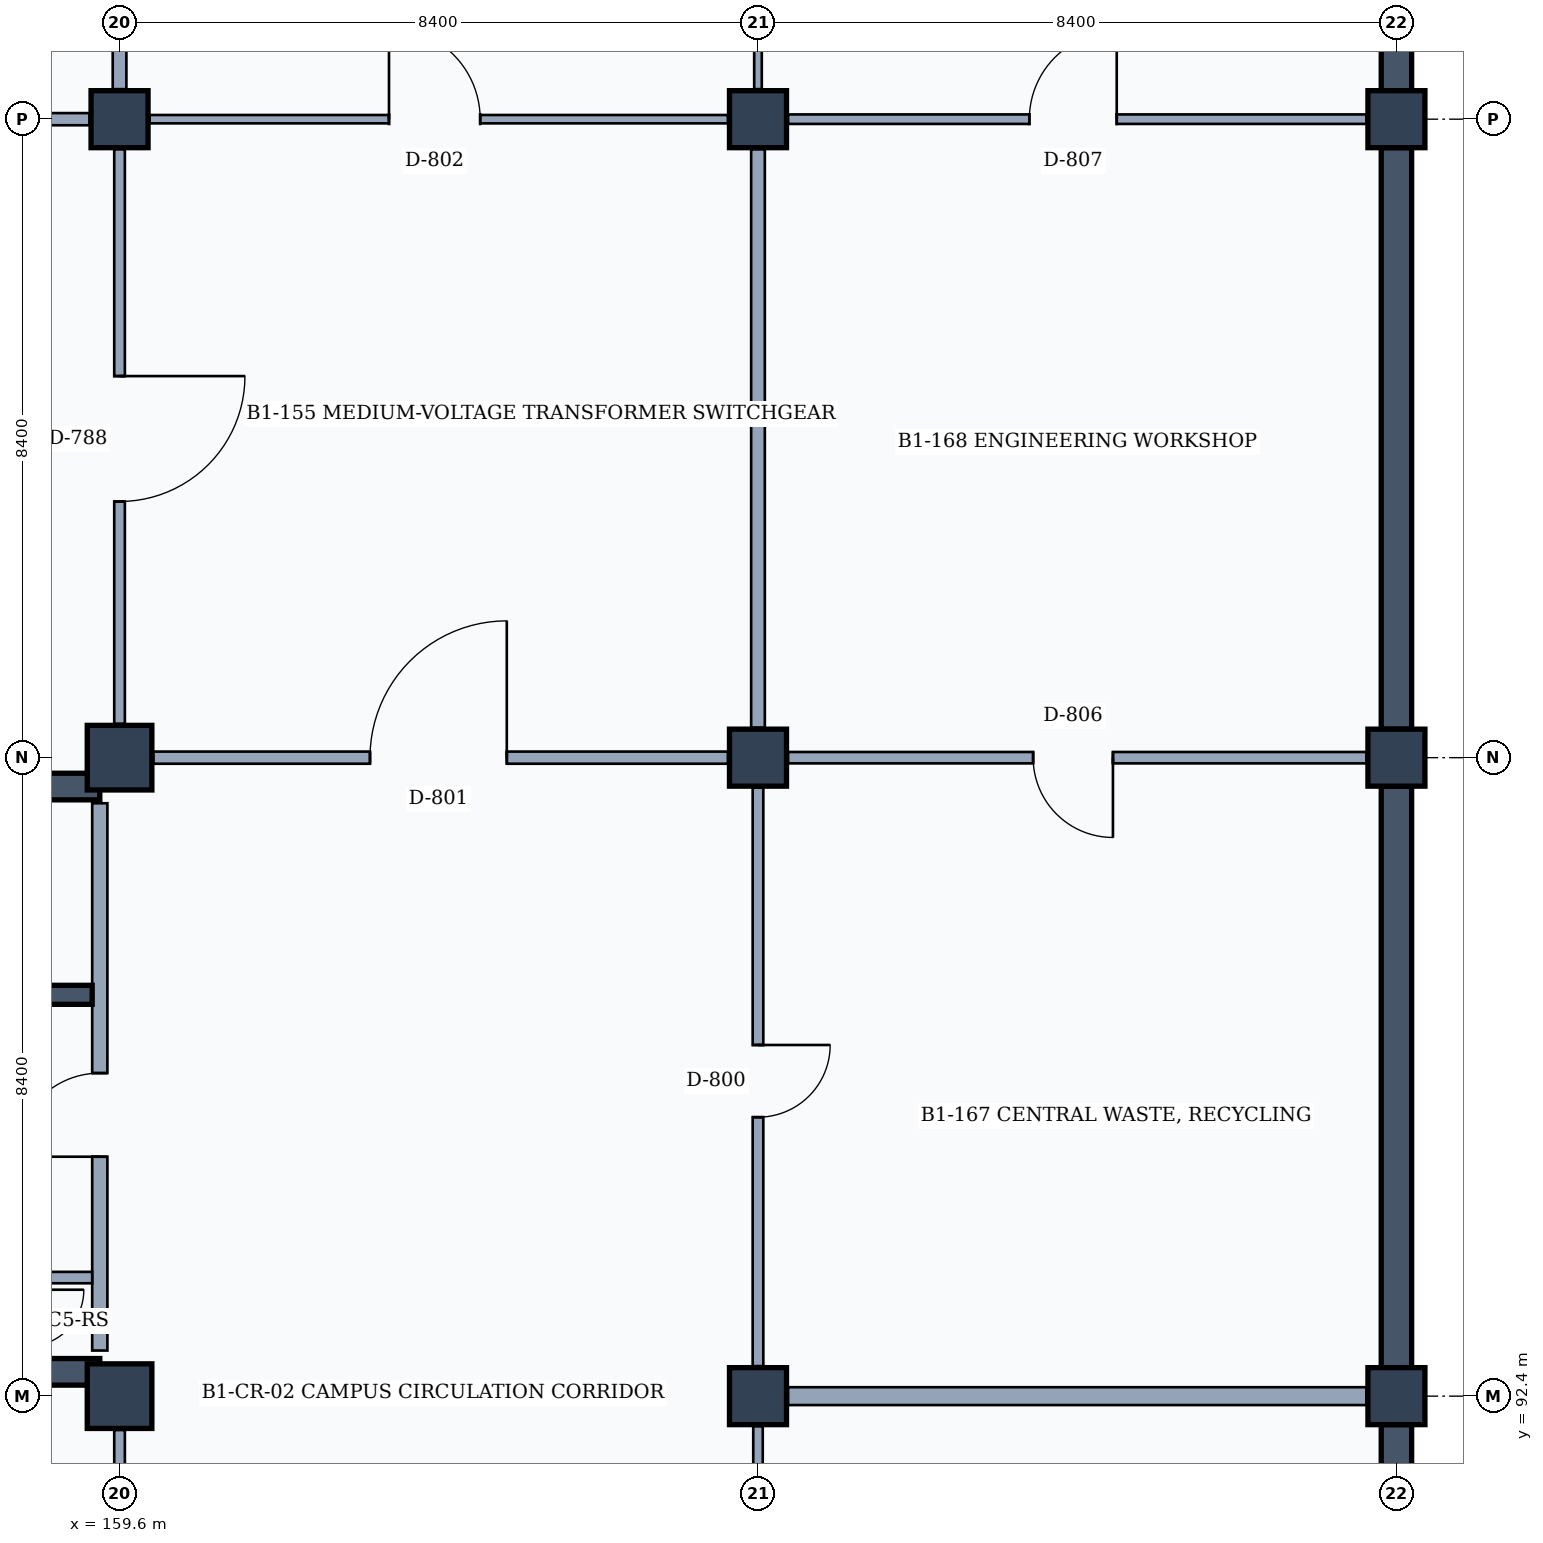
"""IFC4 building model, lengths in metres.
Left out: names, types, materials, properties, quantities, classifications, styles, units other than length and angle.
Written with IfcOpenShell. Run it as: python <this file> out.ifc"""

import sys

from ifc_helpers import new_model, si_unit, direction, frame, frame_2d, origin, origin_2d, place, context, subcontext, project, spatial, rectangle, extrude, element, fill, save


model = new_model("IFC4")
c1 = context("Model", 3, precision=1e-05, world=origin(), true_north=direction((0.0, 1.0)))
c2 = subcontext(c1, "Body", "Model", "MODEL_VIEW")
j1 = project(units=[si_unit("LENGTHUNIT", "METRE"), si_unit("PLANEANGLEUNIT", "RADIAN")], contexts=[c1])
p1 = place(None, origin())
s1 = spatial("IfcSite", under=j1, at=p1, CompositionType="ELEMENT")
p2 = place(p1, origin())
s2 = spatial("IfcBuilding", under=s1, at=p2, CompositionType="ELEMENT")
p3 = place(p2, frame((0.0, 0.0, -4.2)))
s3 = spatial("IfcBuildingStorey", under=s2, at=p3, CompositionType="ELEMENT", Elevation=-4.2)
for number, where, z_axis, x_axis in (
    (1, (159.6, 92.4, 0.0), (0.0, 0.0, 1.0), (1.0, 0.0, 0.0)),
    (2, (159.6, 100.8, 0.0), (0.0, 0.0, 1.0), (1.0, 0.0, 0.0)),
):
    element("IfcColumn", number, at=place(p3, frame(where, z_axis=z_axis, x_axis=x_axis)), inside=s3, PredefinedType="COLUMN", context=c2, shape_type="SweptSolid", body=[
        extrude(rectangle(XDim=0.85, YDim=0.85, at=origin_2d()), origin(), (0.0, 0.0, 1.0), 4.2),
    ])
for number, where, z_axis, x_axis in (
    (3, (159.6, 109.2, 0.0), (0.0, 0.0, 1.0), (1.0, 0.0, 0.0)),
    (4, (168.0, 92.4, 0.0), (0.0, 0.0, 1.0), (1.0, 0.0, 0.0)),
    (5, (168.0, 100.8, 0.0), (0.0, 0.0, 1.0), (1.0, 0.0, 0.0)),
    (6, (168.0, 109.2, 0.0), (0.0, 0.0, 1.0), (1.0, 0.0, 0.0)),
    (7, (176.4, 92.4, 0.0), (0.0, 0.0, 1.0), (1.0, 0.0, 0.0)),
    (8, (176.4, 100.8, 0.0), (0.0, 0.0, 1.0), (1.0, 0.0, 0.0)),
    (9, (176.4, 109.2, 0.0), (0.0, 0.0, 1.0), (1.0, 0.0, 0.0)),
):
    element("IfcColumn", number, at=place(p3, frame(where, z_axis=z_axis, x_axis=x_axis)), inside=s3, PredefinedType="COLUMN", context=c2, shape_type="SweptSolid", body=[
        extrude(rectangle(XDim=0.75, YDim=0.75, at=origin_2d()), origin(), (0.0, 0.0, 1.0), 4.2),
    ])
p4 = place(p3, frame((176.4, 92.025, 0.0), z_axis=(0.0, 0.0, 1.0), x_axis=(0.0, -1.0, 0.0)))
e10 = element("IfcWall", 10, at=p4, inside=s3, PredefinedType="STANDARD", context=c2, shape_type="SweptSolid", body=[
    extrude(rectangle(XDim=7.65, YDim=0.4, at=frame_2d((3.825, 0.0))), origin(), (0.0, 0.0, 1.0), 3.88),
])
p5 = place(p3, frame((176.4, 100.425, 0.0), z_axis=(0.0, 0.0, 1.0), x_axis=(0.0, -1.0, 0.0)))
e11 = element("IfcWall", 11, at=p5, inside=s3, PredefinedType="STANDARD", context=c2, shape_type="SweptSolid", body=[
    extrude(rectangle(XDim=7.65, YDim=0.4, at=frame_2d((3.825, 0.0))), origin(), (0.0, 0.0, 1.0), 3.88),
])
p6 = place(p3, frame((176.4, 108.825, 0.0), z_axis=(0.0, 0.0, 1.0), x_axis=(0.0, -1.0, 0.0)))
e12 = element("IfcWall", 12, at=p6, inside=s3, PredefinedType="STANDARD", context=c2, shape_type="SweptSolid", body=[
    extrude(rectangle(XDim=7.65, YDim=0.4, at=frame_2d((3.825, 0.0))), origin(), (0.0, 0.0, 1.0), 3.88),
])
p7 = place(p3, frame((176.4, 117.225, 0.0), z_axis=(0.0, 0.0, 1.0), x_axis=(0.0, -1.0, 0.0)))
e13 = element("IfcWall", 13, at=p7, inside=s3, PredefinedType="STANDARD", context=c2, shape_type="SweptSolid", body=[
    extrude(rectangle(XDim=7.65, YDim=0.4, at=frame_2d((3.825, 0.0))), origin(), (0.0, 0.0, 1.0), 3.88),
])
p8 = place(p3, frame((151.44, 100.42, 0.0), z_axis=(0.0, 0.0, 1.0), x_axis=(1.0, 0.0, 0.0)))
e14 = element("IfcWall", 14, at=p8, inside=s3, PredefinedType="SHEAR", context=c2, shape_type="SweptSolid", body=[
    extrude(rectangle(XDim=7.9, YDim=0.35, at=frame_2d((3.95, 0.0))), origin(), (0.0, 0.0, 1.0), 3.9),
])
p9 = place(p3, frame((159.34, 100.2, 0.0), z_axis=(0.0, 0.0, 1.0), x_axis=(0.0, -1.0, 0.0)))
e15 = element("IfcWall", 15, at=p9, inside=s3, PredefinedType="PARTITIONING", context=c2, shape_type="SweptSolid", body=[
    extrude(rectangle(XDim=7.2, YDim=0.2, at=frame_2d((3.6, 0.0))), origin(), (0.0, 0.0, 1.0), 3.1),
])
p10 = place(p9, frame((3.55, 0.0, 0.0)))
e16 = element("IfcOpeningElement", 16, at=p10, cuts=e15, PredefinedType="OPENING", context=c2, shape_type="SweptSolid", body=[
    extrude(rectangle(XDim=1.1, YDim=2.15, at=frame_2d((0.55, 1.075))), frame((0.0, 0.11, 0.0), z_axis=(0.0, -1.0, 0.0), x_axis=(1.0, 0.0, 0.0)), (0.0, 0.0, 1.0), 0.22),
])
p11 = place(p3, frame((159.34, 92.72, 0.0), z_axis=(0.0, 0.0, 1.0), x_axis=(-1.0, 0.0, 0.0)))
e17 = element("IfcWall", 17, at=p11, inside=s3, PredefinedType="SHEAR", context=c2, shape_type="SweptSolid", body=[
    extrude(rectangle(XDim=7.9, YDim=0.35, at=frame_2d((3.95, 0.0))), origin(), (0.0, 0.0, 1.0), 3.9),
])
p12 = place(p3, frame((158.38, 93.96, 0.0), z_axis=(0.0, 0.0, 1.0), x_axis=(1.0, 0.0, 0.0)))
e18 = element("IfcWall", 18, at=p12, inside=s3, PredefinedType="PARTITIONING", context=c2, shape_type="SweptSolid", body=[
    extrude(rectangle(XDim=0.86, YDim=0.15, at=frame_2d((0.43, 0.0))), origin(), (0.0, 0.0, 1.0), 3.32),
])
p13 = place(p3, frame((155.78, 97.68, 0.0), z_axis=(0.0, 0.0, 1.0), x_axis=(1.0, 0.0, 0.0)))
e19 = element("IfcWall", 19, at=p13, inside=s3, PredefinedType="SHEAR", context=c2, shape_type="SweptSolid", body=[
    extrude(rectangle(XDim=3.46, YDim=0.25, at=frame_2d((1.73, 0.0))), origin(), (0.0, 0.0, 1.0), 3.9),
])
p14 = place(p13, frame((1.1, 0.0, 0.0)))
e20 = element("IfcOpeningElement", 20, at=p14, cuts=e19, PredefinedType="OPENING", context=c2, shape_type="SweptSolid", body=[
    extrude(rectangle(XDim=1.1, YDim=2.15, at=frame_2d((0.55, 1.075))), frame((0.0, 0.135, 0.0), z_axis=(0.0, -1.0, 0.0), x_axis=(1.0, 0.0, 0.0)), (0.0, 0.0, 1.0), 0.27),
])
p15 = place(p3, frame((159.6, 84.395, 0.0), z_axis=(0.0, 0.0, 1.0), x_axis=(0.0, 1.0, 0.0)))
e21 = element("IfcWall", 21, at=p15, inside=s3, PredefinedType="PARTITIONING", context=c2, shape_type="SweptSolid", body=[
    extrude(rectangle(XDim=7.56, YDim=0.14, at=frame_2d((3.78, 0.0))), origin(), (0.0, 0.0, 1.0), 3.1),
])
p16 = place(p15, frame((3.275, 0.0, 0.0)))
e22 = element("IfcOpeningElement", 22, at=p16, cuts=e21, PredefinedType="OPENING", context=c2, shape_type="SweptSolid", body=[
    extrude(rectangle(XDim=0.95, YDim=2.15, at=frame_2d((0.475, 1.075))), frame((0.0, 0.08, 0.0), z_axis=(0.0, -1.0, 0.0), x_axis=(1.0, 0.0, 0.0)), (0.0, 0.0, 1.0), 0.16),
])
p17 = place(p3, frame((159.6, 101.245, 0.0), z_axis=(0.0, 0.0, 1.0), x_axis=(0.0, 1.0, 0.0)))
e23 = element("IfcWall", 23, at=p17, inside=s3, PredefinedType="PARTITIONING", context=c2, shape_type="SweptSolid", body=[
    extrude(rectangle(XDim=7.56, YDim=0.14, at=frame_2d((3.78, 0.0))), origin(), (0.0, 0.0, 1.0), 3.1),
])
p18 = place(p17, frame((2.925, 0.0, 0.0)))
e24 = element("IfcOpeningElement", 24, at=p18, cuts=e23, PredefinedType="OPENING", context=c2, shape_type="SweptSolid", body=[
    extrude(rectangle(XDim=1.65, YDim=2.25, at=frame_2d((0.825, 1.125))), frame((0.0, 0.08, 0.0), z_axis=(0.0, -1.0, 0.0), x_axis=(1.0, 0.0, 0.0)), (0.0, 0.0, 1.0), 0.16),
])
p19 = place(p3, frame((151.595, 109.2, 0.0), z_axis=(0.0, 0.0, 1.0), x_axis=(1.0, 0.0, 0.0)))
e25 = element("IfcWall", 25, at=p19, inside=s3, PredefinedType="PARTITIONING", context=c2, shape_type="SweptSolid", body=[
    extrude(rectangle(XDim=7.61, YDim=0.16, at=frame_2d((3.805, 0.0))), origin(), (0.0, 0.0, 1.0), 3.05),
])
p20 = place(p19, frame((3.225, 0.0, 0.0)))
e26 = element("IfcOpeningElement", 26, at=p20, cuts=e25, PredefinedType="OPENING", context=c2, shape_type="SweptSolid", body=[
    extrude(rectangle(XDim=1.05, YDim=2.2, at=frame_2d((0.525, 1.1))), frame((0.0, 0.09, 0.0), z_axis=(0.0, -1.0, 0.0), x_axis=(1.0, 0.0, 0.0)), (0.0, 0.0, 1.0), 0.18),
])
p21 = place(p3, frame((159.6, 109.595, 0.0), z_axis=(0.0, 0.0, 1.0), x_axis=(0.0, 1.0, 0.0)))
e27 = element("IfcWall", 27, at=p21, inside=s3, PredefinedType="PARTITIONING", context=c2, shape_type="SweptSolid", body=[
    extrude(rectangle(XDim=7.61, YDim=0.18, at=frame_2d((3.805, 0.0))), origin(), (0.0, 0.0, 1.0), 3.1),
])
p22 = place(p3, frame((168.0, 84.395, 0.0), z_axis=(0.0, 0.0, 1.0), x_axis=(0.0, 1.0, 0.0)))
e28 = element("IfcWall", 28, at=p22, inside=s3, PredefinedType="PARTITIONING", context=c2, shape_type="SweptSolid", body=[
    extrude(rectangle(XDim=7.61, YDim=0.125, at=frame_2d((3.805, 0.0))), origin(), (0.0, 0.0, 1.0), 3.1),
])
p23 = place(p22, frame((3.25, 0.0, 0.0)))
e29 = element("IfcOpeningElement", 29, at=p23, cuts=e28, PredefinedType="OPENING", context=c2, shape_type="SweptSolid", body=[
    extrude(rectangle(XDim=1.0, YDim=2.15, at=frame_2d((0.5, 1.075))), frame((0.0, 0.073, 0.0), z_axis=(0.0, -1.0, 0.0), x_axis=(1.0, 0.0, 0.0)), (0.0, 0.0, 1.0), 0.145),
])
p24 = place(p3, frame((168.0, 92.795, 0.0), z_axis=(0.0, 0.0, 1.0), x_axis=(0.0, 1.0, 0.0)))
e30 = element("IfcWall", 30, at=p24, inside=s3, PredefinedType="PARTITIONING", context=c2, shape_type="SweptSolid", body=[
    extrude(rectangle(XDim=7.61, YDim=0.14, at=frame_2d((3.805, 0.0))), origin(), (0.0, 0.0, 1.0), 3.1),
])
p25 = place(p24, frame((3.275, 0.0, 0.0)))
e31 = element("IfcOpeningElement", 31, at=p25, cuts=e30, PredefinedType="OPENING", context=c2, shape_type="SweptSolid", body=[
    extrude(rectangle(XDim=0.95, YDim=2.15, at=frame_2d((0.475, 1.075))), frame((0.0, 0.08, 0.0), z_axis=(0.0, -1.0, 0.0), x_axis=(1.0, 0.0, 0.0)), (0.0, 0.0, 1.0), 0.16),
])
p26 = place(p3, frame((160.045, 100.8, 0.0), z_axis=(0.0, 0.0, 1.0), x_axis=(1.0, 0.0, 0.0)))
e32 = element("IfcWall", 32, at=p26, inside=s3, PredefinedType="PARTITIONING", context=c2, shape_type="SweptSolid", body=[
    extrude(rectangle(XDim=7.56, YDim=0.16, at=frame_2d((3.78, 0.0))), origin(), (0.0, 0.0, 1.0), 3.05),
])
p27 = place(p26, frame((2.85, 0.0, 0.0)))
e33 = element("IfcOpeningElement", 33, at=p27, cuts=e32, PredefinedType="OPENING", context=c2, shape_type="SweptSolid", body=[
    extrude(rectangle(XDim=1.8, YDim=2.3, at=frame_2d((0.9, 1.15))), frame((0.0, 0.09, 0.0), z_axis=(0.0, -1.0, 0.0), x_axis=(1.0, 0.0, 0.0)), (0.0, 0.0, 1.0), 0.18),
])
p28 = place(p3, frame((168.0, 101.195, 0.0), z_axis=(0.0, 0.0, 1.0), x_axis=(0.0, 1.0, 0.0)))
e34 = element("IfcWall", 34, at=p28, inside=s3, PredefinedType="PARTITIONING", context=c2, shape_type="SweptSolid", body=[
    extrude(rectangle(XDim=7.61, YDim=0.18, at=frame_2d((3.805, 0.0))), origin(), (0.0, 0.0, 1.0), 3.1),
])
p29 = place(p3, frame((159.995, 109.2, 0.0), z_axis=(0.0, 0.0, 1.0), x_axis=(1.0, 0.0, 0.0)))
e35 = element("IfcWall", 35, at=p29, inside=s3, PredefinedType="PARTITIONING", context=c2, shape_type="SweptSolid", body=[
    extrude(rectangle(XDim=7.61, YDim=0.11, at=frame_2d((3.805, 0.0))), origin(), (0.0, 0.0, 1.0), 3.05),
])
p30 = place(p29, frame((3.15, 0.0, 0.0)))
e36 = element("IfcOpeningElement", 36, at=p30, cuts=e35, PredefinedType="OPENING", context=c2, shape_type="SweptSolid", body=[
    extrude(rectangle(XDim=1.2, YDim=2.2, at=frame_2d((0.6, 1.1))), frame((0.0, 0.065, 0.0), z_axis=(0.0, -1.0, 0.0), x_axis=(1.0, 0.0, 0.0)), (0.0, 0.0, 1.0), 0.13),
])
p31 = place(p3, frame((168.0, 109.595, 0.0), z_axis=(0.0, 0.0, 1.0), x_axis=(0.0, 1.0, 0.0)))
e37 = element("IfcWall", 37, at=p31, inside=s3, PredefinedType="MOVABLE", context=c2, shape_type="SweptSolid", body=[
    extrude(rectangle(XDim=7.61, YDim=0.1, at=frame_2d((3.805, 0.0))), origin(), (0.0, 0.0, 1.0), 3.1),
])
p32 = place(p3, frame((168.395, 92.4, 0.0), z_axis=(0.0, 0.0, 1.0), x_axis=(1.0, 0.0, 0.0)))
e38 = element("IfcWall", 38, at=p32, inside=s3, PredefinedType="PARTITIONING", context=c2, shape_type="SweptSolid", body=[
    extrude(rectangle(XDim=7.61, YDim=0.235, at=frame_2d((3.805, 0.0))), origin(), (0.0, 0.0, 1.0), 3.05),
])
p33 = place(p3, frame((168.395, 100.8, 0.0), z_axis=(0.0, 0.0, 1.0), x_axis=(1.0, 0.0, 0.0)))
e39 = element("IfcWall", 39, at=p33, inside=s3, PredefinedType="PARTITIONING", context=c2, shape_type="SweptSolid", body=[
    extrude(rectangle(XDim=7.61, YDim=0.15, at=frame_2d((3.805, 0.0))), origin(), (0.0, 0.0, 1.0), 3.05),
])
p34 = place(p33, frame((3.225, 0.0, 0.0)))
e40 = element("IfcOpeningElement", 40, at=p34, cuts=e39, PredefinedType="OPENING", context=c2, shape_type="SweptSolid", body=[
    extrude(rectangle(XDim=1.05, YDim=2.2, at=frame_2d((0.525, 1.1))), frame((0.0, 0.085, 0.0), z_axis=(0.0, -1.0, 0.0), x_axis=(1.0, 0.0, 0.0)), (0.0, 0.0, 1.0), 0.17),
])
p35 = place(p3, frame((168.395, 109.2, 0.0), z_axis=(0.0, 0.0, 1.0), x_axis=(1.0, 0.0, 0.0)))
e41 = element("IfcWall", 41, at=p35, inside=s3, PredefinedType="PARTITIONING", context=c2, shape_type="SweptSolid", body=[
    extrude(rectangle(XDim=7.61, YDim=0.125, at=frame_2d((3.805, 0.0))), origin(), (0.0, 0.0, 1.0), 3.05),
])
p36 = place(p35, frame((3.175, 0.0, 0.0)))
e42 = element("IfcOpeningElement", 42, at=p36, cuts=e41, PredefinedType="OPENING", context=c2, shape_type="SweptSolid", body=[
    extrude(rectangle(XDim=1.15, YDim=2.25, at=frame_2d((0.575, 1.125))), frame((0.0, 0.073, 0.0), z_axis=(0.0, -1.0, 0.0), x_axis=(1.0, 0.0, 0.0)), (0.0, 0.0, 1.0), 0.145),
])
p37 = place(p10, frame((1.1, 0.0, 0.0), z_axis=(0.0, 0.0, 1.0), x_axis=(-1.0, 0.0, 0.0)))
e43 = element("IfcDoor", 43, at=p37, inside=s3, OperationType="SINGLE_SWING_LEFT", PredefinedType="DOOR", context=c2, shape_type="SweptSolid", body=[
    extrude(rectangle(XDim=1.1, YDim=2.15, at=frame_2d((0.55, 1.075))), frame((0.0, 0.025, 0.0), z_axis=(0.0, -1.0, 0.0), x_axis=(1.0, 0.0, 0.0)), (0.0, 0.0, 1.0), 0.05),
])
fill(e16, e43)
p38 = place(p18, frame((1.65, 0.0, 0.0), z_axis=(0.0, 0.0, 1.0), x_axis=(-1.0, 0.0, 0.0)))
e44 = element("IfcDoor", 44, at=p38, inside=s3, OperationType="SINGLE_SWING_LEFT", PredefinedType="DOOR", context=c2, shape_type="SweptSolid", body=[
    extrude(rectangle(XDim=1.65, YDim=2.25, at=frame_2d((0.825, 1.125))), frame((0.0, 0.025, 0.0), z_axis=(0.0, -1.0, 0.0), x_axis=(1.0, 0.0, 0.0)), (0.0, 0.0, 1.0), 0.05),
])
fill(e24, e44)
p39 = place(p25, frame((0.95, 0.0, 0.0), z_axis=(0.0, 0.0, 1.0), x_axis=(-1.0, 0.0, 0.0)))
e45 = element("IfcDoor", 45, at=p39, inside=s3, OperationType="SINGLE_SWING_LEFT", PredefinedType="DOOR", context=c2, shape_type="SweptSolid", body=[
    extrude(rectangle(XDim=0.95, YDim=2.15, at=frame_2d((0.475, 1.075))), frame((0.0, 0.025, 0.0), z_axis=(0.0, -1.0, 0.0), x_axis=(1.0, 0.0, 0.0)), (0.0, 0.0, 1.0), 0.05),
])
fill(e31, e45)
p40 = place(p27, origin())
e46 = element("IfcDoor", 46, at=p40, inside=s3, OperationType="SINGLE_SWING_RIGHT", PredefinedType="DOOR", context=c2, shape_type="SweptSolid", body=[
    extrude(rectangle(XDim=1.8, YDim=2.3, at=frame_2d((0.9, 1.15))), frame((0.0, 0.025, 0.0), z_axis=(0.0, -1.0, 0.0), x_axis=(1.0, 0.0, 0.0)), (0.0, 0.0, 1.0), 0.05),
])
fill(e33, e46)
p41 = place(p30, origin())
e47 = element("IfcDoor", 47, at=p41, inside=s3, OperationType="SINGLE_SWING_LEFT", PredefinedType="DOOR", context=c2, shape_type="SweptSolid", body=[
    extrude(rectangle(XDim=1.2, YDim=2.2, at=frame_2d((0.6, 1.1))), frame((0.0, 0.025, 0.0), z_axis=(0.0, -1.0, 0.0), x_axis=(1.0, 0.0, 0.0)), (0.0, 0.0, 1.0), 0.05),
])
fill(e36, e47)
p42 = place(p34, frame((1.05, 0.0, 0.0), z_axis=(0.0, 0.0, 1.0), x_axis=(-1.0, 0.0, 0.0)))
e48 = element("IfcDoor", 48, at=p42, inside=s3, OperationType="SINGLE_SWING_LEFT", PredefinedType="DOOR", context=c2, shape_type="SweptSolid", body=[
    extrude(rectangle(XDim=1.05, YDim=2.2, at=frame_2d((0.525, 1.1))), frame((0.0, 0.025, 0.0), z_axis=(0.0, -1.0, 0.0), x_axis=(1.0, 0.0, 0.0)), (0.0, 0.0, 1.0), 0.05),
])
fill(e40, e48)
p43 = place(p36, origin())
e49 = element("IfcDoor", 49, at=p43, inside=s3, OperationType="SINGLE_SWING_RIGHT", PredefinedType="DOOR", context=c2, shape_type="SweptSolid", body=[
    extrude(rectangle(XDim=1.15, YDim=2.25, at=frame_2d((0.575, 1.125))), frame((0.0, 0.025, 0.0), z_axis=(0.0, -1.0, 0.0), x_axis=(1.0, 0.0, 0.0)), (0.0, 0.0, 1.0), 0.05),
])
fill(e42, e49)
save(model, sys.argv[1])
